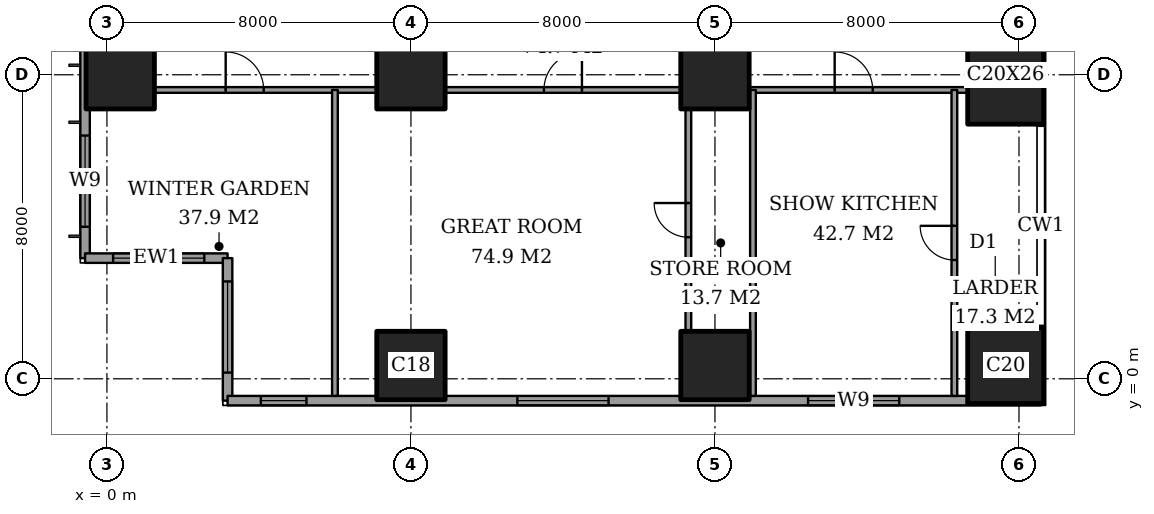
"""IFC4 building model, lengths in metres.
Left out: names, types, materials, properties, quantities, classifications, styles, units other than length and angle.
Written with IfcOpenShell. Run it as: python <this file> out.ifc"""

import sys

from ifc_helpers import new_model, si_unit, direction, frame, frame_2d, origin, origin_2d, place, context, subcontext, project, spatial, rectangle, extrude, element, fill, save


model = new_model("IFC4")
c1 = context("Model", 3, precision=1e-05, world=origin(), true_north=direction((0.0, 1.0)))
c2 = subcontext(c1, "Body", "Model", "MODEL_VIEW")
j1 = project(units=[si_unit("LENGTHUNIT", "METRE"), si_unit("PLANEANGLEUNIT", "RADIAN")], contexts=[c1])
p1 = place(None, origin())
s1 = spatial("IfcSite", under=j1, at=p1, CompositionType="ELEMENT")
p2 = place(p1, origin())
s2 = spatial("IfcBuilding", under=s1, at=p2, CompositionType="ELEMENT")
p3 = place(p2, frame((0.0, 0.0, 185.8)))
s3 = spatial("IfcBuildingStorey", under=s2, at=p3, CompositionType="ELEMENT", Elevation=185.8)
for number, where, z_axis, x_axis in (
    (1, (0.35, 8.0, 0.0), (0.0, 0.0, 1.0), (1.0, 0.0, 0.0)),
    (2, (8.0, 0.35, 0.0), (0.0, 0.0, 1.0), (1.0, 0.0, 0.0)),
    (3, (8.0, 8.0, 0.0), (0.0, 0.0, 1.0), (1.0, 0.0, 0.0)),
    (4, (16.0, 0.35, 0.0), (0.0, 0.0, 1.0), (1.0, 0.0, 0.0)),
    (5, (16.0, 8.0, 0.0), (0.0, 0.0, 1.0), (1.0, 0.0, 0.0)),
):
    element("IfcColumn", number, at=place(p3, frame(where, z_axis=z_axis, x_axis=x_axis)), inside=s3, PredefinedType="COLUMN", context=c2, shape_type="SweptSolid", body=[
        extrude(rectangle(XDim=1.8, YDim=1.8, at=origin_2d()), origin(), (0.0, 0.0, 1.0), 3.6),
    ])
p4 = place(p3, frame((23.65, 0.35, 0.0), z_axis=(0.0, 0.0, 1.0), x_axis=(1.0, 0.0, 0.0)))
e6 = element("IfcColumn", 6, at=p4, inside=s3, PredefinedType="COLUMN", context=c2, shape_type="SweptSolid", body=[
    extrude(rectangle(XDim=2.0, YDim=2.0, at=origin_2d()), origin(), (0.0, 0.0, 1.0), 3.6),
])
p5 = place(p3, frame((23.65, 8.0, 0.0), z_axis=(0.0, 0.0, 1.0), x_axis=(1.0, 0.0, 0.0)))
e7 = element("IfcColumn", 7, at=p5, inside=s3, PredefinedType="COLUMN", context=c2, shape_type="SweptSolid", body=[
    extrude(rectangle(XDim=2.0, YDim=2.6, at=origin_2d()), origin(), (0.0, 0.0, 1.0), 3.6),
])
p6 = place(p3, frame((-0.575, 44.825, 0.0), z_axis=(0.0, 0.0, 1.0), x_axis=(0.0, -1.0, 0.0)))
e8 = element("IfcWall", 8, at=p6, inside=s3, PredefinedType="SOLIDWALL", context=c2, shape_type="SweptSolid", body=[
    extrude(rectangle(XDim=41.65, YDim=0.25, at=frame_2d((20.825, 0.0))), origin(), (0.0, 0.0, 1.0), 3.6),
])
p7 = place(p6, frame((0.825, 0.0, 0.2)))
e9 = element("IfcOpeningElement", 9, at=p7, cuts=e8, PredefinedType="OPENING", context=c2, shape_type="SweptSolid", body=[
    extrude(rectangle(XDim=2.4, YDim=2.4, at=frame_2d((1.2, 1.2))), frame((0.0, 0.135, 0.0), z_axis=(0.0, -1.0, 0.0), x_axis=(1.0, 0.0, 0.0)), (0.0, 0.0, 1.0), 0.27),
])
p8 = place(p6, frame((6.05, 0.0, 0.2)))
e10 = element("IfcOpeningElement", 10, at=p8, cuts=e8, PredefinedType="OPENING", context=c2, shape_type="SweptSolid", body=[
    extrude(rectangle(XDim=1.2, YDim=2.4, at=frame_2d((0.6, 1.2))), frame((0.0, 0.135, 0.0), z_axis=(0.0, -1.0, 0.0), x_axis=(1.0, 0.0, 0.0)), (0.0, 0.0, 1.0), 0.27),
])
p9 = place(p6, frame((8.475, 0.0, 0.2)))
e11 = element("IfcOpeningElement", 11, at=p9, cuts=e8, PredefinedType="OPENING", context=c2, shape_type="SweptSolid", body=[
    extrude(rectangle(XDim=2.4, YDim=2.4, at=frame_2d((1.2, 1.2))), frame((0.0, 0.135, 0.0), z_axis=(0.0, -1.0, 0.0), x_axis=(1.0, 0.0, 0.0)), (0.0, 0.0, 1.0), 0.27),
])
p10 = place(p6, frame((15.625, 0.0, 0.2)))
e12 = element("IfcOpeningElement", 12, at=p10, cuts=e8, PredefinedType="OPENING", context=c2, shape_type="SweptSolid", body=[
    extrude(rectangle(XDim=2.4, YDim=2.4, at=frame_2d((1.2, 1.2))), frame((0.0, 0.135, 0.0), z_axis=(0.0, -1.0, 0.0), x_axis=(1.0, 0.0, 0.0)), (0.0, 0.0, 1.0), 0.27),
])
p11 = place(p6, frame((23.625, 0.0, 0.2)))
e13 = element("IfcOpeningElement", 13, at=p11, cuts=e8, PredefinedType="OPENING", context=c2, shape_type="SweptSolid", body=[
    extrude(rectangle(XDim=2.4, YDim=2.4, at=frame_2d((1.2, 1.2))), frame((0.0, 0.135, 0.0), z_axis=(0.0, -1.0, 0.0), x_axis=(1.0, 0.0, 0.0)), (0.0, 0.0, 1.0), 0.27),
])
p12 = place(p6, frame((30.775, 0.0, 0.2)))
e14 = element("IfcOpeningElement", 14, at=p12, cuts=e8, PredefinedType="OPENING", context=c2, shape_type="SweptSolid", body=[
    extrude(rectangle(XDim=2.4, YDim=2.4, at=frame_2d((1.2, 1.2))), frame((0.0, 0.135, 0.0), z_axis=(0.0, -1.0, 0.0), x_axis=(1.0, 0.0, 0.0)), (0.0, 0.0, 1.0), 0.27),
])
p13 = place(p6, frame((34.55, 0.0, 0.2)))
e15 = element("IfcOpeningElement", 15, at=p13, cuts=e8, PredefinedType="OPENING", context=c2, shape_type="SweptSolid", body=[
    extrude(rectangle(XDim=1.2, YDim=2.4, at=frame_2d((0.6, 1.2))), frame((0.0, 0.135, 0.0), z_axis=(0.0, -1.0, 0.0), x_axis=(1.0, 0.0, 0.0)), (0.0, 0.0, 1.0), 0.27),
])
p14 = place(p6, frame((38.425, 0.0, 0.2)))
e16 = element("IfcOpeningElement", 16, at=p14, cuts=e8, PredefinedType="OPENING", context=c2, shape_type="SweptSolid", body=[
    extrude(rectangle(XDim=2.4, YDim=2.4, at=frame_2d((1.2, 1.2))), frame((0.0, 0.135, 0.0), z_axis=(0.0, -1.0, 0.0), x_axis=(1.0, 0.0, 0.0)), (0.0, 0.0, 1.0), 0.27),
])
p15 = place(p3, frame((-0.575, 3.175, 0.0), z_axis=(0.0, 0.0, 1.0), x_axis=(1.0, 0.0, 0.0)))
e17 = element("IfcWall", 17, at=p15, inside=s3, PredefinedType="SOLIDWALL", context=c2, shape_type="SweptSolid", body=[
    extrude(rectangle(XDim=3.75, YDim=0.25, at=frame_2d((1.875, 0.0))), origin(), (0.0, 0.0, 1.0), 3.6),
])
p16 = place(p15, frame((0.738, 0.0, 0.2)))
e18 = element("IfcOpeningElement", 18, at=p16, cuts=e17, PredefinedType="OPENING", context=c2, shape_type="SweptSolid", body=[
    extrude(rectangle(XDim=2.4, YDim=2.4, at=frame_2d((1.2, 1.2))), frame((0.0, 0.135, 0.0), z_axis=(0.0, -1.0, 0.0), x_axis=(1.0, 0.0, 0.0)), (0.0, 0.0, 1.0), 0.27),
])
p17 = place(p3, frame((3.175, 3.175, 0.0), z_axis=(0.0, 0.0, 1.0), x_axis=(0.0, -1.0, 0.0)))
e19 = element("IfcWall", 19, at=p17, inside=s3, PredefinedType="SOLIDWALL", context=c2, shape_type="SweptSolid", body=[
    extrude(rectangle(XDim=3.75, YDim=0.25, at=frame_2d((1.875, 0.0))), origin(), (0.0, 0.0, 1.0), 3.6),
])
p18 = place(p17, frame((0.613, 0.0, 0.2)))
e20 = element("IfcOpeningElement", 20, at=p18, cuts=e19, PredefinedType="OPENING", context=c2, shape_type="SweptSolid", body=[
    extrude(rectangle(XDim=2.4, YDim=2.4, at=frame_2d((1.2, 1.2))), frame((0.0, 0.135, 0.0), z_axis=(0.0, -1.0, 0.0), x_axis=(1.0, 0.0, 0.0)), (0.0, 0.0, 1.0), 0.27),
])
p19 = place(p3, frame((3.175, -0.575, 0.0), z_axis=(0.0, 0.0, 1.0), x_axis=(1.0, 0.0, 0.0)))
e21 = element("IfcWall", 21, at=p19, inside=s3, PredefinedType="SOLIDWALL", context=c2, shape_type="SweptSolid", body=[
    extrude(rectangle(XDim=21.4, YDim=0.25, at=frame_2d((10.7, 0.0))), origin(), (0.0, 0.0, 1.0), 3.6),
])
p20 = place(p19, frame((0.875, 0.0, 0.2)))
e22 = element("IfcOpeningElement", 22, at=p20, cuts=e21, PredefinedType="OPENING", context=c2, shape_type="SweptSolid", body=[
    extrude(rectangle(XDim=1.2, YDim=2.4, at=frame_2d((0.6, 1.2))), frame((0.0, 0.135, 0.0), z_axis=(0.0, -1.0, 0.0), x_axis=(1.0, 0.0, 0.0)), (0.0, 0.0, 1.0), 0.27),
])
p21 = place(p19, frame((7.625, 0.0, 0.2)))
e23 = element("IfcOpeningElement", 23, at=p21, cuts=e21, PredefinedType="OPENING", context=c2, shape_type="SweptSolid", body=[
    extrude(rectangle(XDim=2.4, YDim=2.4, at=frame_2d((1.2, 1.2))), frame((0.0, 0.135, 0.0), z_axis=(0.0, -1.0, 0.0), x_axis=(1.0, 0.0, 0.0)), (0.0, 0.0, 1.0), 0.27),
])
p22 = place(p19, frame((15.275, 0.0, 0.2)))
e24 = element("IfcOpeningElement", 24, at=p22, cuts=e21, PredefinedType="OPENING", context=c2, shape_type="SweptSolid", body=[
    extrude(rectangle(XDim=2.4, YDim=2.4, at=frame_2d((1.2, 1.2))), frame((0.0, 0.135, 0.0), z_axis=(0.0, -1.0, 0.0), x_axis=(1.0, 0.0, 0.0)), (0.0, 0.0, 1.0), 0.27),
])
p23 = place(p3, frame((1.25, 7.6, 0.0), z_axis=(0.0, 0.0, 1.0), x_axis=(1.0, 0.0, 0.0)))
e25 = element("IfcWall", 25, at=p23, inside=s3, PredefinedType="PARTITIONING", context=c2, shape_type="SweptSolid", body=[
    extrude(rectangle(XDim=5.85, YDim=0.15, at=frame_2d((2.925, 0.0))), origin(), (0.0, 0.0, 1.0), 3.35),
])
p24 = place(p23, frame((1.875, 0.0, 0.0)))
e26 = element("IfcOpeningElement", 26, at=p24, cuts=e25, PredefinedType="OPENING", context=c2, shape_type="SweptSolid", body=[
    extrude(rectangle(XDim=1.0, YDim=2.1, at=frame_2d((0.5, 1.05))), frame((0.0, 0.085, 0.0), z_axis=(0.0, -1.0, 0.0), x_axis=(1.0, 0.0, 0.0)), (0.0, 0.0, 1.0), 0.17),
])
p25 = place(p3, frame((8.9, 7.6, 0.0), z_axis=(0.0, 0.0, 1.0), x_axis=(1.0, 0.0, 0.0)))
e27 = element("IfcWall", 27, at=p25, inside=s3, PredefinedType="PARTITIONING", context=c2, shape_type="SweptSolid", body=[
    extrude(rectangle(XDim=6.2, YDim=0.15, at=frame_2d((3.1, 0.0))), origin(), (0.0, 0.0, 1.0), 3.35),
])
p26 = place(p25, frame((2.6, 0.0, 0.0)))
e28 = element("IfcOpeningElement", 28, at=p26, cuts=e27, PredefinedType="OPENING", context=c2, shape_type="SweptSolid", body=[
    extrude(rectangle(XDim=1.0, YDim=2.1, at=frame_2d((0.5, 1.05))), frame((0.0, 0.085, 0.0), z_axis=(0.0, -1.0, 0.0), x_axis=(1.0, 0.0, 0.0)), (0.0, 0.0, 1.0), 0.17),
])
p27 = place(p3, frame((16.9, 7.6, 0.0), z_axis=(0.0, 0.0, 1.0), x_axis=(1.0, 0.0, 0.0)))
e29 = element("IfcWall", 29, at=p27, inside=s3, PredefinedType="PARTITIONING", context=c2, shape_type="SweptSolid", body=[
    extrude(rectangle(XDim=5.75, YDim=0.15, at=frame_2d((2.875, 0.0))), origin(), (0.0, 0.0, 1.0), 3.35),
])
p28 = place(p27, frame((2.25, 0.0, 0.0)))
e30 = element("IfcOpeningElement", 30, at=p28, cuts=e29, PredefinedType="OPENING", context=c2, shape_type="SweptSolid", body=[
    extrude(rectangle(XDim=1.0, YDim=2.1, at=frame_2d((0.5, 1.05))), frame((0.0, 0.085, 0.0), z_axis=(0.0, -1.0, 0.0), x_axis=(1.0, 0.0, 0.0)), (0.0, 0.0, 1.0), 0.17),
])
p29 = place(p3, frame((6.0, -0.45, 0.0), z_axis=(0.0, 0.0, 1.0), x_axis=(0.0, 1.0, 0.0)))
e31 = element("IfcWall", 31, at=p29, inside=s3, PredefinedType="PARTITIONING", context=c2, shape_type="SweptSolid", body=[
    extrude(rectangle(XDim=8.05, YDim=0.15, at=frame_2d((4.025, 0.0))), origin(), (0.0, 0.0, 1.0), 3.35),
])
p30 = place(p3, frame((15.3, 1.25, 0.0), z_axis=(0.0, 0.0, 1.0), x_axis=(0.0, 1.0, 0.0)))
e32 = element("IfcWall", 32, at=p30, inside=s3, PredefinedType="PARTITIONING", context=c2, shape_type="SweptSolid", body=[
    extrude(rectangle(XDim=5.85, YDim=0.15, at=frame_2d((2.925, 0.0))), origin(), (0.0, 0.0, 1.0), 3.35),
])
p31 = place(p30, frame((2.475, 0.0, 0.0)))
e33 = element("IfcOpeningElement", 33, at=p31, cuts=e32, PredefinedType="OPENING", context=c2, shape_type="SweptSolid", body=[
    extrude(rectangle(XDim=0.9, YDim=2.1, at=frame_2d((0.45, 1.05))), frame((0.0, 0.085, 0.0), z_axis=(0.0, -1.0, 0.0), x_axis=(1.0, 0.0, 0.0)), (0.0, 0.0, 1.0), 0.17),
])
p32 = place(p3, frame((17.0, -0.45, 0.0), z_axis=(0.0, 0.0, 1.0), x_axis=(0.0, 1.0, 0.0)))
e34 = element("IfcWall", 34, at=p32, inside=s3, PredefinedType="PARTITIONING", context=c2, shape_type="SweptSolid", body=[
    extrude(rectangle(XDim=8.05, YDim=0.15, at=frame_2d((4.025, 0.0))), origin(), (0.0, 0.0, 1.0), 3.35),
])
p33 = place(p3, frame((22.3, -0.45, 0.0), z_axis=(0.0, 0.0, 1.0), x_axis=(0.0, 1.0, 0.0)))
e35 = element("IfcWall", 35, at=p33, inside=s3, PredefinedType="PARTITIONING", context=c2, shape_type="SweptSolid", body=[
    extrude(rectangle(XDim=8.05, YDim=0.15, at=frame_2d((4.025, 0.0))), origin(), (0.0, 0.0, 1.0), 3.35),
])
p34 = place(p33, frame((3.575, 0.0, 0.0)))
e36 = element("IfcOpeningElement", 36, at=p34, cuts=e35, PredefinedType="OPENING", context=c2, shape_type="SweptSolid", body=[
    extrude(rectangle(XDim=0.9, YDim=2.1, at=frame_2d((0.45, 1.05))), frame((0.0, 0.085, 0.0), z_axis=(0.0, -1.0, 0.0), x_axis=(1.0, 0.0, 0.0)), (0.0, 0.0, 1.0), 0.17),
])
p35 = place(p14, origin())
e37 = element("IfcWindow", 37, at=p35, inside=s3, PartitioningType="SINGLE_PANEL", PredefinedType="WINDOW", context=c2, shape_type="SweptSolid", body=[
    extrude(rectangle(XDim=2.4, YDim=2.4, at=frame_2d((1.2, 1.2))), frame((0.0, 0.03, 0.0), z_axis=(0.0, -1.0, 0.0), x_axis=(1.0, 0.0, 0.0)), (0.0, 0.0, 1.0), 0.06),
])
fill(e16, e37)
p36 = place(p16, origin())
e38 = element("IfcWindow", 38, at=p36, inside=s3, PartitioningType="SINGLE_PANEL", PredefinedType="WINDOW", context=c2, shape_type="SweptSolid", body=[
    extrude(rectangle(XDim=2.4, YDim=2.4, at=frame_2d((1.2, 1.2))), frame((0.0, 0.03, 0.0), z_axis=(0.0, -1.0, 0.0), x_axis=(1.0, 0.0, 0.0)), (0.0, 0.0, 1.0), 0.06),
])
fill(e18, e38)
p37 = place(p18, origin())
e39 = element("IfcWindow", 39, at=p37, inside=s3, PartitioningType="SINGLE_PANEL", PredefinedType="WINDOW", context=c2, shape_type="SweptSolid", body=[
    extrude(rectangle(XDim=2.4, YDim=2.4, at=frame_2d((1.2, 1.2))), frame((0.0, 0.03, 0.0), z_axis=(0.0, -1.0, 0.0), x_axis=(1.0, 0.0, 0.0)), (0.0, 0.0, 1.0), 0.06),
])
fill(e20, e39)
p38 = place(p20, origin())
e40 = element("IfcWindow", 40, at=p38, inside=s3, PartitioningType="SINGLE_PANEL", PredefinedType="WINDOW", context=c2, shape_type="SweptSolid", body=[
    extrude(rectangle(XDim=1.2, YDim=2.4, at=frame_2d((0.6, 1.2))), frame((0.0, 0.03, 0.0), z_axis=(0.0, -1.0, 0.0), x_axis=(1.0, 0.0, 0.0)), (0.0, 0.0, 1.0), 0.06),
])
fill(e22, e40)
p39 = place(p21, origin())
e41 = element("IfcWindow", 41, at=p39, inside=s3, PartitioningType="SINGLE_PANEL", PredefinedType="WINDOW", context=c2, shape_type="SweptSolid", body=[
    extrude(rectangle(XDim=2.4, YDim=2.4, at=frame_2d((1.2, 1.2))), frame((0.0, 0.03, 0.0), z_axis=(0.0, -1.0, 0.0), x_axis=(1.0, 0.0, 0.0)), (0.0, 0.0, 1.0), 0.06),
])
fill(e23, e41)
p40 = place(p22, origin())
e42 = element("IfcWindow", 42, at=p40, inside=s3, PartitioningType="SINGLE_PANEL", PredefinedType="WINDOW", context=c2, shape_type="SweptSolid", body=[
    extrude(rectangle(XDim=2.4, YDim=2.4, at=frame_2d((1.2, 1.2))), frame((0.0, 0.03, 0.0), z_axis=(0.0, -1.0, 0.0), x_axis=(1.0, 0.0, 0.0)), (0.0, 0.0, 1.0), 0.06),
])
fill(e24, e42)
p41 = place(p24, origin())
e43 = element("IfcDoor", 43, at=p41, inside=s3, OperationType="SINGLE_SWING_RIGHT", PredefinedType="DOOR", context=c2, shape_type="SweptSolid", body=[
    extrude(rectangle(XDim=1.0, YDim=2.1, at=frame_2d((0.5, 1.05))), frame((0.0, 0.025, 0.0), z_axis=(0.0, -1.0, 0.0), x_axis=(1.0, 0.0, 0.0)), (0.0, 0.0, 1.0), 0.05),
])
fill(e26, e43)
p42 = place(p26, origin())
e44 = element("IfcDoor", 44, at=p42, inside=s3, OperationType="SINGLE_SWING_LEFT", PredefinedType="DOOR", context=c2, shape_type="SweptSolid", body=[
    extrude(rectangle(XDim=1.0, YDim=2.1, at=frame_2d((0.5, 1.05))), frame((0.0, 0.025, 0.0), z_axis=(0.0, -1.0, 0.0), x_axis=(1.0, 0.0, 0.0)), (0.0, 0.0, 1.0), 0.05),
])
fill(e28, e44)
p43 = place(p31, origin())
e45 = element("IfcDoor", 45, at=p43, inside=s3, OperationType="SINGLE_SWING_LEFT", PredefinedType="DOOR", context=c2, shape_type="SweptSolid", body=[
    extrude(rectangle(XDim=0.9, YDim=2.1, at=frame_2d((0.45, 1.05))), frame((0.0, 0.025, 0.0), z_axis=(0.0, -1.0, 0.0), x_axis=(1.0, 0.0, 0.0)), (0.0, 0.0, 1.0), 0.05),
])
fill(e33, e45)
p44 = place(p28, origin())
e46 = element("IfcDoor", 46, at=p44, inside=s3, OperationType="SINGLE_SWING_RIGHT", PredefinedType="DOOR", context=c2, shape_type="SweptSolid", body=[
    extrude(rectangle(XDim=1.0, YDim=2.1, at=frame_2d((0.5, 1.05))), frame((0.0, 0.025, 0.0), z_axis=(0.0, -1.0, 0.0), x_axis=(1.0, 0.0, 0.0)), (0.0, 0.0, 1.0), 0.05),
])
fill(e30, e46)
p45 = place(p34, origin())
e47 = element("IfcDoor", 47, at=p45, inside=s3, OperationType="SINGLE_SWING_LEFT", PredefinedType="DOOR", context=c2, shape_type="SweptSolid", body=[
    extrude(rectangle(XDim=0.9, YDim=2.1, at=frame_2d((0.45, 1.05))), frame((0.0, 0.025, 0.0), z_axis=(0.0, -1.0, 0.0), x_axis=(1.0, 0.0, 0.0)), (0.0, 0.0, 1.0), 0.05),
])
fill(e36, e47)
save(model, sys.argv[1])
